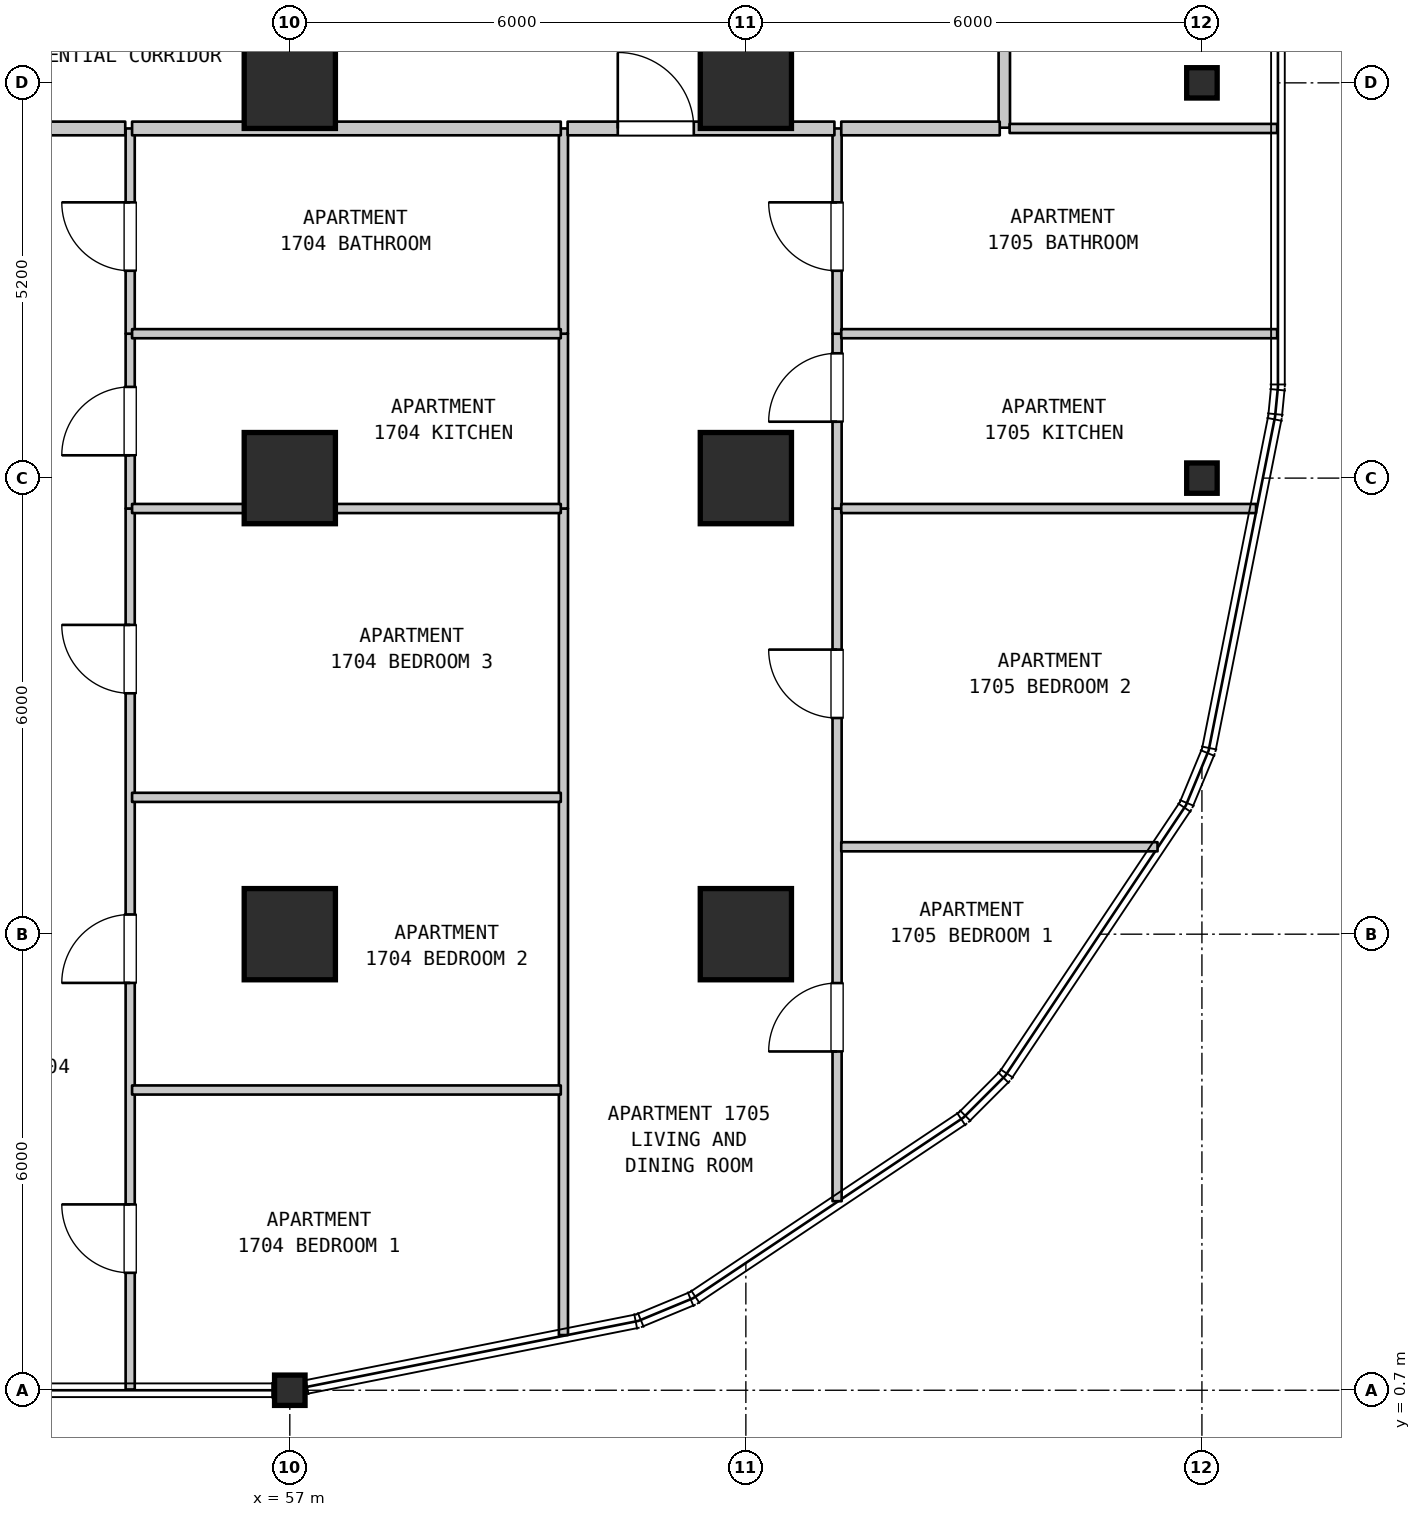
"""IFC4 building model, lengths in metres.
Left out: names, types, materials, properties, quantities, classifications, styles, units other than length and angle.
Written with IfcOpenShell. Run it as: python <this file> out.ifc"""

import sys

from ifc_helpers import new_model, si_unit, direction, frame, frame_2d, origin, origin_2d, place, context, subcontext, project, spatial, rectangle, i_section, extrude, element, fill, save


model = new_model("IFC4")
c1 = context("Model", 3, precision=1e-05, world=origin(), true_north=direction((0.0, 1.0)))
c2 = subcontext(c1, "Body", "Model", "MODEL_VIEW")
j1 = project(units=[si_unit("LENGTHUNIT", "METRE"), si_unit("PLANEANGLEUNIT", "RADIAN")], contexts=[c1])
p1 = place(None, origin())
s1 = spatial("IfcSite", under=j1, at=p1, CompositionType="ELEMENT")
p2 = place(p1, origin())
s2 = spatial("IfcBuilding", under=s1, at=p2, CompositionType="ELEMENT")
p3 = place(p2, frame((0.0, 0.0, 73.8)))
s3 = spatial("IfcBuildingStorey", under=s2, at=p3, CompositionType="ELEMENT", Elevation=73.8)
p4 = place(p3, frame((57.0, 0.7, 0.0), z_axis=(0.0, 0.0, 1.0), x_axis=(1.0, 0.0, 0.0)))
e1 = element("IfcColumn", 1, at=p4, inside=s3, PredefinedType="COLUMN", context=c2, shape_type="SweptSolid", body=[
    extrude(i_section(OverallWidth=0.401, OverallDepth=0.399, WebThickness=0.025, FlangeThickness=0.04, FilletRadius=0.015, at=origin_2d()), origin(), (0.0, 0.0, 1.0), 3.7),
])
for number, where, z_axis, x_axis in (
    (2, (57.0, 6.7, 0.0), (0.0, 0.0, 1.0), (1.0, 0.0, 0.0)),
    (3, (57.0, 12.7, 0.0), (0.0, 0.0, 1.0), (1.0, 0.0, 0.0)),
    (4, (57.0, 17.9, 0.0), (0.0, 0.0, 1.0), (1.0, 0.0, 0.0)),
    (5, (63.0, 6.7, 0.0), (0.0, 0.0, 1.0), (1.0, 0.0, 0.0)),
    (6, (63.0, 12.7, 0.0), (0.0, 0.0, 1.0), (1.0, 0.0, 0.0)),
    (7, (63.0, 17.9, 0.0), (0.0, 0.0, 1.0), (1.0, 0.0, 0.0)),
):
    element("IfcColumn", number, at=place(p3, frame(where, z_axis=z_axis, x_axis=x_axis)), inside=s3, PredefinedType="COLUMN", context=c2, shape_type="SweptSolid", body=[
        extrude(rectangle(XDim=1.2, YDim=1.2, at=origin_2d()), origin(), (0.0, 0.0, 1.0), 3.7),
    ])
for number, where, z_axis, x_axis in (
    (8, (69.0, 12.7, 0.0), (0.0, 0.0, 1.0), (1.0, 0.0, 0.0)),
    (9, (69.0, 17.9, 0.0), (0.0, 0.0, 1.0), (1.0, 0.0, 0.0)),
):
    element("IfcColumn", number, at=place(p3, frame(where, z_axis=z_axis, x_axis=x_axis)), inside=s3, PredefinedType="COLUMN", context=c2, shape_type="SweptSolid", body=[
        extrude(i_section(OverallWidth=0.401, OverallDepth=0.399, WebThickness=0.025, FlangeThickness=0.04, FilletRadius=0.015, at=origin_2d()), origin(), (0.0, 0.0, 1.0), 3.7),
    ])
p5 = place(p3, frame((54.9, 0.71, 0.0), z_axis=(0.0, 0.0, 1.0), x_axis=(0.0, 1.0, 0.0)))
e10 = element("IfcWall", 10, at=p5, inside=s3, PredefinedType="PARTITIONING", context=c2, shape_type="SweptSolid", body=[
    extrude(rectangle(XDim=11.59, YDim=0.12, at=frame_2d((5.795, 0.0))), origin(), (0.0, 0.0, 1.0), 3.385),
])
p6 = place(p5, frame((1.535, 0.0, 0.0)))
e11 = element("IfcOpeningElement", 11, at=p6, cuts=e10, PredefinedType="OPENING", context=c2, shape_type="SweptSolid", body=[
    extrude(rectangle(XDim=0.9, YDim=2.15, at=frame_2d((0.45, 1.075))), frame((0.0, 0.07, 0.0), z_axis=(0.0, -1.0, 0.0), x_axis=(1.0, 0.0, 0.0)), (0.0, 0.0, 1.0), 0.14),
])
p7 = place(p5, frame((5.349, 0.0, 0.0)))
e12 = element("IfcOpeningElement", 12, at=p7, cuts=e10, PredefinedType="OPENING", context=c2, shape_type="SweptSolid", body=[
    extrude(rectangle(XDim=0.9, YDim=2.15, at=frame_2d((0.45, 1.075))), frame((0.0, 0.07, 0.0), z_axis=(0.0, -1.0, 0.0), x_axis=(1.0, 0.0, 0.0)), (0.0, 0.0, 1.0), 0.14),
])
p8 = place(p5, frame((9.159, 0.0, 0.0)))
e13 = element("IfcOpeningElement", 13, at=p8, cuts=e10, PredefinedType="OPENING", context=c2, shape_type="SweptSolid", body=[
    extrude(rectangle(XDim=0.9, YDim=2.15, at=frame_2d((0.45, 1.075))), frame((0.0, 0.07, 0.0), z_axis=(0.0, -1.0, 0.0), x_axis=(1.0, 0.0, 0.0)), (0.0, 0.0, 1.0), 0.14),
])
p9 = place(p3, frame((54.9, 12.3, 0.0), z_axis=(0.0, 0.0, 1.0), x_axis=(0.0, 1.0, 0.0)))
e14 = element("IfcWall", 14, at=p9, inside=s3, PredefinedType="PARTITIONING", context=c2, shape_type="SweptSolid", body=[
    extrude(rectangle(XDim=2.3, YDim=0.12, at=frame_2d((1.15, 0.0))), origin(), (0.0, 0.0, 1.0), 3.385),
])
p10 = place(p9, frame((0.7, 0.0, 0.0)))
e15 = element("IfcOpeningElement", 15, at=p10, cuts=e14, PredefinedType="OPENING", context=c2, shape_type="SweptSolid", body=[
    extrude(rectangle(XDim=0.9, YDim=2.15, at=frame_2d((0.45, 1.075))), frame((0.0, 0.07, 0.0), z_axis=(0.0, -1.0, 0.0), x_axis=(1.0, 0.0, 0.0)), (0.0, 0.0, 1.0), 0.14),
])
p11 = place(p3, frame((54.9, 14.6, 0.0), z_axis=(0.0, 0.0, 1.0), x_axis=(0.0, 1.0, 0.0)))
e16 = element("IfcWall", 16, at=p11, inside=s3, PredefinedType="PARTITIONING", context=c2, shape_type="SweptSolid", body=[
    extrude(rectangle(XDim=2.7, YDim=0.12, at=frame_2d((1.35, 0.0))), origin(), (0.0, 0.0, 1.0), 3.385),
])
p12 = place(p11, frame((0.828, 0.0, 0.0)))
e17 = element("IfcOpeningElement", 17, at=p12, cuts=e16, PredefinedType="OPENING", context=c2, shape_type="SweptSolid", body=[
    extrude(rectangle(XDim=0.9, YDim=2.1, at=frame_2d((0.45, 1.05))), frame((0.0, 0.07, 0.0), z_axis=(0.0, -1.0, 0.0), x_axis=(1.0, 0.0, 0.0)), (0.0, 0.0, 1.0), 0.14),
])
p13 = place(p3, frame((60.6, 1.426, 0.0), z_axis=(0.0, 0.0, 1.0), x_axis=(0.0, 1.0, 0.0)))
e18 = element("IfcWall", 18, at=p13, inside=s3, PredefinedType="PARTITIONING", context=c2, shape_type="SweptSolid", body=[
    extrude(rectangle(XDim=10.874, YDim=0.12, at=frame_2d((5.437, 0.0))), origin(), (0.0, 0.0, 1.0), 3.385),
])
p14 = place(p3, frame((60.6, 12.3, 0.0), z_axis=(0.0, 0.0, 1.0), x_axis=(0.0, 1.0, 0.0)))
e19 = element("IfcWall", 19, at=p14, inside=s3, PredefinedType="PARTITIONING", context=c2, shape_type="SweptSolid", body=[
    extrude(rectangle(XDim=2.3, YDim=0.12, at=frame_2d((1.15, 0.0))), origin(), (0.0, 0.0, 1.0), 3.385),
])
p15 = place(p3, frame((60.6, 14.6, 0.0), z_axis=(0.0, 0.0, 1.0), x_axis=(0.0, 1.0, 0.0)))
e20 = element("IfcWall", 20, at=p15, inside=s3, PredefinedType="PARTITIONING", context=c2, shape_type="SweptSolid", body=[
    extrude(rectangle(XDim=2.7, YDim=0.12, at=frame_2d((1.35, 0.0))), origin(), (0.0, 0.0, 1.0), 3.385),
])
p16 = place(p3, frame((64.2, 3.187, 0.0), z_axis=(0.0, 0.0, 1.0), x_axis=(0.0, 1.0, 0.0)))
e21 = element("IfcWall", 21, at=p16, inside=s3, PredefinedType="PARTITIONING", context=c2, shape_type="SweptSolid", body=[
    extrude(rectangle(XDim=9.113, YDim=0.12, at=frame_2d((4.557, 0.0))), origin(), (0.0, 0.0, 1.0), 3.385),
])
p17 = place(p16, frame((1.97, 0.0, 0.0)))
e22 = element("IfcOpeningElement", 22, at=p17, cuts=e21, PredefinedType="OPENING", context=c2, shape_type="SweptSolid", body=[
    extrude(rectangle(XDim=0.9, YDim=2.15, at=frame_2d((0.45, 1.075))), frame((0.0, 0.07, 0.0), z_axis=(0.0, -1.0, 0.0), x_axis=(1.0, 0.0, 0.0)), (0.0, 0.0, 1.0), 0.14),
])
p18 = place(p16, frame((6.357, 0.0, 0.0)))
e23 = element("IfcOpeningElement", 23, at=p18, cuts=e21, PredefinedType="OPENING", context=c2, shape_type="SweptSolid", body=[
    extrude(rectangle(XDim=0.9, YDim=2.15, at=frame_2d((0.45, 1.075))), frame((0.0, 0.07, 0.0), z_axis=(0.0, -1.0, 0.0), x_axis=(1.0, 0.0, 0.0)), (0.0, 0.0, 1.0), 0.14),
])
p19 = place(p3, frame((64.2, 12.3, 0.0), z_axis=(0.0, 0.0, 1.0), x_axis=(0.0, 1.0, 0.0)))
e24 = element("IfcWall", 24, at=p19, inside=s3, PredefinedType="PARTITIONING", context=c2, shape_type="SweptSolid", body=[
    extrude(rectangle(XDim=2.3, YDim=0.12, at=frame_2d((1.15, 0.0))), origin(), (0.0, 0.0, 1.0), 3.385),
])
p20 = place(p19, frame((1.142, 0.0, 0.0)))
e25 = element("IfcOpeningElement", 25, at=p20, cuts=e24, PredefinedType="OPENING", context=c2, shape_type="SweptSolid", body=[
    extrude(rectangle(XDim=0.9, YDim=2.15, at=frame_2d((0.45, 1.075))), frame((0.0, 0.07, 0.0), z_axis=(0.0, -1.0, 0.0), x_axis=(1.0, 0.0, 0.0)), (0.0, 0.0, 1.0), 0.14),
])
p21 = place(p3, frame((64.2, 14.6, 0.0), z_axis=(0.0, 0.0, 1.0), x_axis=(0.0, 1.0, 0.0)))
e26 = element("IfcWall", 26, at=p21, inside=s3, PredefinedType="PARTITIONING", context=c2, shape_type="SweptSolid", body=[
    extrude(rectangle(XDim=2.7, YDim=0.12, at=frame_2d((1.35, 0.0))), origin(), (0.0, 0.0, 1.0), 3.385),
])
p22 = place(p21, frame((0.828, 0.0, 0.0)))
e27 = element("IfcOpeningElement", 27, at=p22, cuts=e26, PredefinedType="OPENING", context=c2, shape_type="SweptSolid", body=[
    extrude(rectangle(XDim=0.9, YDim=2.1, at=frame_2d((0.45, 1.05))), frame((0.0, 0.07, 0.0), z_axis=(0.0, -1.0, 0.0), x_axis=(1.0, 0.0, 0.0)), (0.0, 0.0, 1.0), 0.14),
])
p23 = place(p3, frame((66.4, 17.31, 0.0), z_axis=(0.0, 0.0, 1.0), x_axis=(0.0, 1.0, 0.0)))
e28 = element("IfcWall", 28, at=p23, inside=s3, PredefinedType="STANDARD", context=c2, shape_type="SweptSolid", body=[
    extrude(rectangle(XDim=2.19, YDim=0.15, at=frame_2d((1.095, 0.0))), origin(), (0.0, 0.0, 1.0), 3.385),
])
p24 = place(p3, frame((54.925, 4.65, 0.0), z_axis=(0.0, 0.0, 1.0), x_axis=(1.0, 0.0, 0.0)))
e29 = element("IfcWall", 29, at=p24, inside=s3, PredefinedType="PARTITIONING", context=c2, shape_type="SweptSolid", body=[
    extrude(rectangle(XDim=5.64, YDim=0.12, at=frame_2d((2.82, 0.0))), origin(), (0.0, 0.0, 1.0), 3.385),
])
p25 = place(p3, frame((64.255, 7.85, 0.0), z_axis=(0.0, 0.0, 1.0), x_axis=(1.0, 0.0, 0.0)))
e30 = element("IfcWall", 30, at=p25, inside=s3, PredefinedType="PARTITIONING", context=c2, shape_type="SweptSolid", body=[
    extrude(rectangle(XDim=4.161, YDim=0.12, at=frame_2d((2.081, 0.0))), origin(), (0.0, 0.0, 1.0), 3.385),
])
for number, where, z_axis, x_axis in (
    (31, (54.925, 8.5, 0.0), (0.0, 0.0, 1.0), (1.0, 0.0, 0.0)),
    (32, (54.925, 12.3, 0.0), (0.0, 0.0, 1.0), (1.0, 0.0, 0.0)),
):
    element("IfcWall", number, at=place(p3, frame(where, z_axis=z_axis, x_axis=x_axis)), inside=s3, PredefinedType="PARTITIONING", context=c2, shape_type="SweptSolid", body=[
        extrude(rectangle(XDim=5.64, YDim=0.12, at=frame_2d((2.82, 0.0))), origin(), (0.0, 0.0, 1.0), 3.385),
    ])
p26 = place(p3, frame((64.255, 12.3, 0.0), z_axis=(0.0, 0.0, 1.0), x_axis=(1.0, 0.0, 0.0)))
e33 = element("IfcWall", 33, at=p26, inside=s3, PredefinedType="PARTITIONING", context=c2, shape_type="SweptSolid", body=[
    extrude(rectangle(XDim=5.457, YDim=0.12, at=frame_2d((2.729, 0.0))), origin(), (0.0, 0.0, 1.0), 3.385),
])
p27 = place(p3, frame((54.925, 14.6, 0.0), z_axis=(0.0, 0.0, 1.0), x_axis=(1.0, 0.0, 0.0)))
e34 = element("IfcWall", 34, at=p27, inside=s3, PredefinedType="PARTITIONING", context=c2, shape_type="SweptSolid", body=[
    extrude(rectangle(XDim=5.64, YDim=0.12, at=frame_2d((2.82, 0.0))), origin(), (0.0, 0.0, 1.0), 3.385),
])
p28 = place(p3, frame((64.255, 14.6, 0.0), z_axis=(0.0, 0.0, 1.0), x_axis=(1.0, 0.0, 0.0)))
e35 = element("IfcWall", 35, at=p28, inside=s3, PredefinedType="PARTITIONING", context=c2, shape_type="SweptSolid", body=[
    extrude(rectangle(XDim=5.735, YDim=0.12, at=frame_2d((2.868, 0.0))), origin(), (0.0, 0.0, 1.0), 3.385),
])
p29 = place(p3, frame((50.875, 17.3, 0.0), z_axis=(0.0, 0.0, 1.0), x_axis=(1.0, 0.0, 0.0)))
e36 = element("IfcWall", 36, at=p29, inside=s3, PredefinedType="STANDARD", context=c2, shape_type="SweptSolid", body=[
    extrude(rectangle(XDim=3.96, YDim=0.18, at=frame_2d((1.98, 0.0))), origin(), (0.0, 0.0, 1.0), 3.385),
])
p30 = place(p29, frame((1.609, 0.0, 0.0)))
e37 = element("IfcOpeningElement", 37, at=p30, cuts=e36, PredefinedType="OPENING", context=c2, shape_type="SweptSolid", body=[
    extrude(rectangle(XDim=1.0, YDim=2.15, at=frame_2d((0.5, 1.075))), frame((0.0, 0.1, 0.0), z_axis=(0.0, -1.0, 0.0), x_axis=(1.0, 0.0, 0.0)), (0.0, 0.0, 1.0), 0.2),
])
p31 = place(p3, frame((54.925, 17.3, 0.0), z_axis=(0.0, 0.0, 1.0), x_axis=(1.0, 0.0, 0.0)))
e38 = element("IfcWall", 38, at=p31, inside=s3, PredefinedType="STANDARD", context=c2, shape_type="SweptSolid", body=[
    extrude(rectangle(XDim=5.64, YDim=0.18, at=frame_2d((2.82, 0.0))), origin(), (0.0, 0.0, 1.0), 3.385),
])
p32 = place(p3, frame((60.655, 17.3, 0.0), z_axis=(0.0, 0.0, 1.0), x_axis=(1.0, 0.0, 0.0)))
e39 = element("IfcWall", 39, at=p32, inside=s3, PredefinedType="STANDARD", context=c2, shape_type="SweptSolid", body=[
    extrude(rectangle(XDim=3.51, YDim=0.18, at=frame_2d((1.755, 0.0))), origin(), (0.0, 0.0, 1.0), 3.385),
])
p33 = place(p32, frame((0.66, 0.0, 0.0)))
e40 = element("IfcOpeningElement", 40, at=p33, cuts=e39, PredefinedType="OPENING", context=c2, shape_type="SweptSolid", body=[
    extrude(rectangle(XDim=1.0, YDim=2.15, at=frame_2d((0.5, 1.075))), frame((0.0, 0.1, 0.0), z_axis=(0.0, -1.0, 0.0), x_axis=(1.0, 0.0, 0.0)), (0.0, 0.0, 1.0), 0.2),
])
p34 = place(p3, frame((64.255, 17.3, 0.0), z_axis=(0.0, 0.0, 1.0), x_axis=(1.0, 0.0, 0.0)))
e41 = element("IfcWall", 41, at=p34, inside=s3, PredefinedType="STANDARD", context=c2, shape_type="SweptSolid", body=[
    extrude(rectangle(XDim=2.085, YDim=0.18, at=frame_2d((1.042, 0.0))), origin(), (0.0, 0.0, 1.0), 3.385),
])
p35 = place(p3, frame((66.47, 17.3, 0.0), z_axis=(0.0, 0.0, 1.0), x_axis=(1.0, 0.0, 0.0)))
e42 = element("IfcWall", 42, at=p35, inside=s3, PredefinedType="PARTITIONING", context=c2, shape_type="SweptSolid", body=[
    extrude(rectangle(XDim=3.52, YDim=0.12, at=frame_2d((1.76, 0.0))), origin(), (0.0, 0.0, 1.0), 3.385),
])
p36 = place(p6, origin())
e43 = element("IfcDoor", 43, at=p36, inside=s3, OperationType="SINGLE_SWING_RIGHT", PredefinedType="DOOR", context=c2, shape_type="SweptSolid", body=[
    extrude(rectangle(XDim=0.9, YDim=2.15, at=frame_2d((0.45, 1.075))), frame((0.0, 0.025, 0.0), z_axis=(0.0, -1.0, 0.0), x_axis=(1.0, 0.0, 0.0)), (0.0, 0.0, 1.0), 0.05),
])
fill(e11, e43)
p37 = place(p7, origin())
e44 = element("IfcDoor", 44, at=p37, inside=s3, OperationType="SINGLE_SWING_LEFT", PredefinedType="DOOR", context=c2, shape_type="SweptSolid", body=[
    extrude(rectangle(XDim=0.9, YDim=2.15, at=frame_2d((0.45, 1.075))), frame((0.0, 0.025, 0.0), z_axis=(0.0, -1.0, 0.0), x_axis=(1.0, 0.0, 0.0)), (0.0, 0.0, 1.0), 0.05),
])
fill(e12, e44)
p38 = place(p8, origin())
e45 = element("IfcDoor", 45, at=p38, inside=s3, OperationType="SINGLE_SWING_RIGHT", PredefinedType="DOOR", context=c2, shape_type="SweptSolid", body=[
    extrude(rectangle(XDim=0.9, YDim=2.15, at=frame_2d((0.45, 1.075))), frame((0.0, 0.025, 0.0), z_axis=(0.0, -1.0, 0.0), x_axis=(1.0, 0.0, 0.0)), (0.0, 0.0, 1.0), 0.05),
])
fill(e13, e45)
p39 = place(p10, origin())
e46 = element("IfcDoor", 46, at=p39, inside=s3, OperationType="SINGLE_SWING_LEFT", PredefinedType="DOOR", context=c2, shape_type="SweptSolid", body=[
    extrude(rectangle(XDim=0.9, YDim=2.15, at=frame_2d((0.45, 1.075))), frame((0.0, 0.025, 0.0), z_axis=(0.0, -1.0, 0.0), x_axis=(1.0, 0.0, 0.0)), (0.0, 0.0, 1.0), 0.05),
])
fill(e15, e46)
p40 = place(p12, origin())
e47 = element("IfcDoor", 47, at=p40, inside=s3, OperationType="SINGLE_SWING_RIGHT", PredefinedType="DOOR", context=c2, shape_type="SweptSolid", body=[
    extrude(rectangle(XDim=0.9, YDim=2.1, at=frame_2d((0.45, 1.05))), frame((0.0, 0.025, 0.0), z_axis=(0.0, -1.0, 0.0), x_axis=(1.0, 0.0, 0.0)), (0.0, 0.0, 1.0), 0.05),
])
fill(e17, e47)
p41 = place(p17, origin())
e48 = element("IfcDoor", 48, at=p41, inside=s3, OperationType="SINGLE_SWING_LEFT", PredefinedType="DOOR", context=c2, shape_type="SweptSolid", body=[
    extrude(rectangle(XDim=0.9, YDim=2.15, at=frame_2d((0.45, 1.075))), frame((0.0, 0.025, 0.0), z_axis=(0.0, -1.0, 0.0), x_axis=(1.0, 0.0, 0.0)), (0.0, 0.0, 1.0), 0.05),
])
fill(e22, e48)
p42 = place(p18, origin())
e49 = element("IfcDoor", 49, at=p42, inside=s3, OperationType="SINGLE_SWING_RIGHT", PredefinedType="DOOR", context=c2, shape_type="SweptSolid", body=[
    extrude(rectangle(XDim=0.9, YDim=2.15, at=frame_2d((0.45, 1.075))), frame((0.0, 0.025, 0.0), z_axis=(0.0, -1.0, 0.0), x_axis=(1.0, 0.0, 0.0)), (0.0, 0.0, 1.0), 0.05),
])
fill(e23, e49)
p43 = place(p20, origin())
e50 = element("IfcDoor", 50, at=p43, inside=s3, OperationType="SINGLE_SWING_LEFT", PredefinedType="DOOR", context=c2, shape_type="SweptSolid", body=[
    extrude(rectangle(XDim=0.9, YDim=2.15, at=frame_2d((0.45, 1.075))), frame((0.0, 0.025, 0.0), z_axis=(0.0, -1.0, 0.0), x_axis=(1.0, 0.0, 0.0)), (0.0, 0.0, 1.0), 0.05),
])
fill(e25, e50)
p44 = place(p22, origin())
e51 = element("IfcDoor", 51, at=p44, inside=s3, OperationType="SINGLE_SWING_RIGHT", PredefinedType="DOOR", context=c2, shape_type="SweptSolid", body=[
    extrude(rectangle(XDim=0.9, YDim=2.1, at=frame_2d((0.45, 1.05))), frame((0.0, 0.025, 0.0), z_axis=(0.0, -1.0, 0.0), x_axis=(1.0, 0.0, 0.0)), (0.0, 0.0, 1.0), 0.05),
])
fill(e27, e51)
p45 = place(p33, origin())
e52 = element("IfcDoor", 52, at=p45, inside=s3, OperationType="SINGLE_SWING_LEFT", PredefinedType="DOOR", context=c2, shape_type="SweptSolid", body=[
    extrude(rectangle(XDim=1.0, YDim=2.15, at=frame_2d((0.5, 1.075))), frame((0.0, 0.025, 0.0), z_axis=(0.0, -1.0, 0.0), x_axis=(1.0, 0.0, 0.0)), (0.0, 0.0, 1.0), 0.05),
])
fill(e40, e52)
save(model, sys.argv[1])
